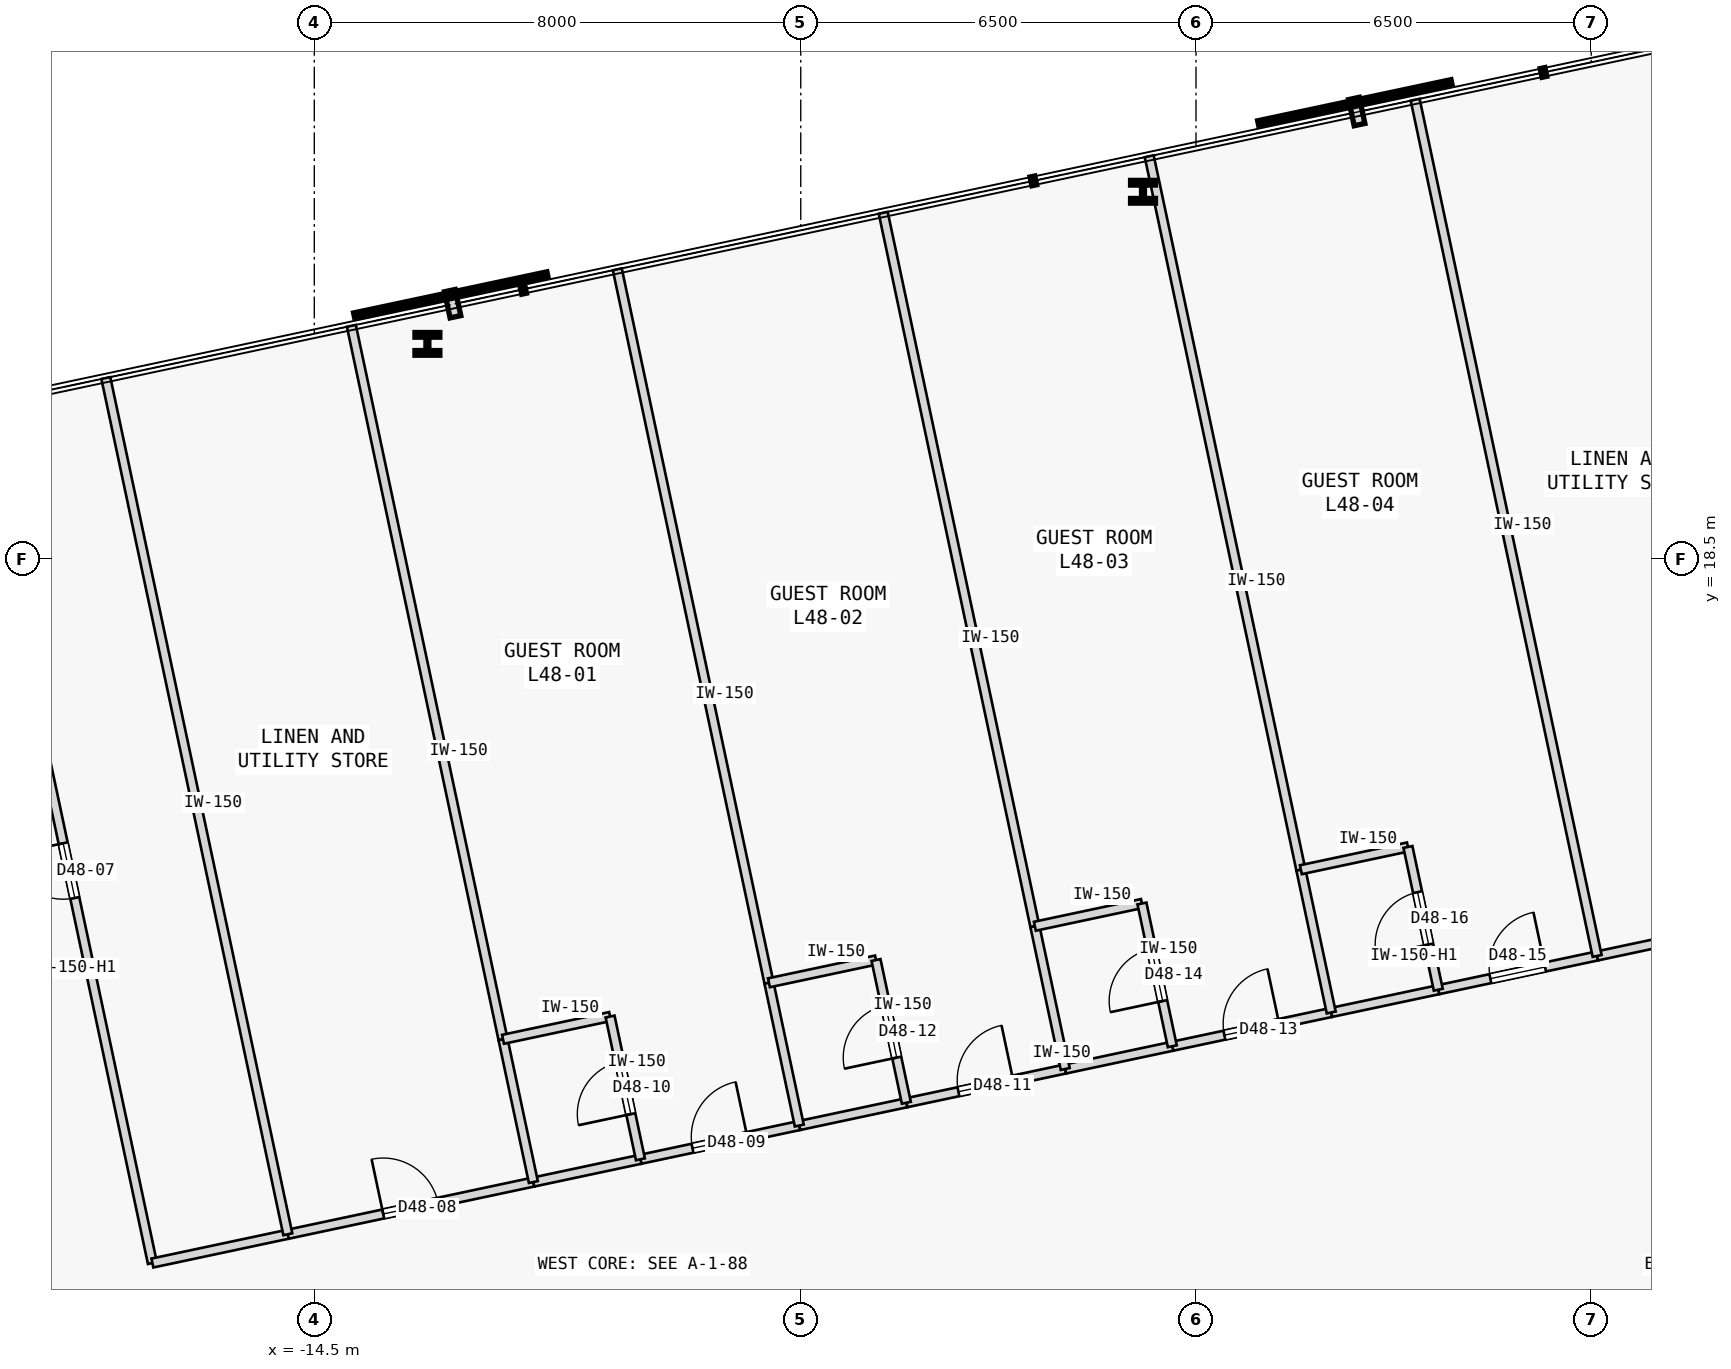
"""IFC4 building model, lengths in metres.
Left out: names, types, materials, properties, quantities, classifications, styles, units other than length and angle.
Written with IfcOpenShell. Run it as: python <this file> out.ifc"""

import sys

from ifc_helpers import new_model, si_unit, direction, frame, frame_2d, origin, origin_2d, place, context, subcontext, project, spatial, rectangle, i_section, extrude, element, fill, save


model = new_model("IFC4")
c1 = context("Model", 3, precision=1e-05, world=origin(), true_north=direction((0.0, 1.0)))
c2 = subcontext(c1, "Body", "Model", "MODEL_VIEW")
j1 = project(units=[si_unit("LENGTHUNIT", "METRE"), si_unit("PLANEANGLEUNIT", "RADIAN")], contexts=[c1])
p1 = place(None, origin())
s1 = spatial("IfcSite", under=j1, at=p1, CompositionType="ELEMENT")
p2 = place(p1, origin())
s2 = spatial("IfcBuilding", under=s1, at=p2, CompositionType="ELEMENT")
p3 = place(p2, frame((0.0, 0.0, 185.4)))
s3 = spatial("IfcBuildingStorey", under=s2, at=p3, CompositionType="ELEMENT", Elevation=185.4)
for number, where, z_axis, x_axis in (
    (1, (-0.872, 24.543, 0.0), (0.0, 0.0, 1.0), (1.0, 0.0, 0.0)),
    (2, (-12.64, 22.042, 0.0), (0.0, 0.0, 1.0), (1.0, 0.0, 0.0)),
):
    element("IfcColumn", number, at=place(p3, frame(where, z_axis=z_axis, x_axis=x_axis)), inside=s3, PredefinedType="COLUMN", context=c2, shape_type="SweptSolid", body=[
        extrude(i_section(OverallWidth=0.409, OverallDepth=0.374, WebThickness=0.048, FlangeThickness=0.077, FilletRadius=0.015, at=origin_2d()), origin(), (0.0, 0.0, 1.0), 3.4),
    ])
p4 = place(p3, frame((-17.162, 6.926, 0.0), z_axis=(0.0, 0.0, 1.0), x_axis=(-0.207911421929, 0.978147657888, 0.0)))
e3 = element("IfcWall", 3, at=p4, inside=s3, PredefinedType="PARTITIONING", context=c2, shape_type="SweptSolid", body=[
    extrude(rectangle(XDim=13.195, YDim=0.15, at=frame_2d((6.598, 0.0))), origin(), (0.0, 0.0, 1.0), 2.725),
])
p5 = place(p4, frame((6.137, 0.0, 0.0)))
e4 = element("IfcOpeningElement", 4, at=p5, cuts=e3, PredefinedType="OPENING", context=c2, shape_type="SweptSolid", body=[
    extrude(rectangle(XDim=0.92, YDim=2.15, at=frame_2d((0.46, 1.075))), frame((0.0, 0.085, 0.0), z_axis=(0.0, -1.0, 0.0), x_axis=(1.0, 0.0, 0.0)), (0.0, 0.0, 1.0), 0.17),
])
p6 = place(p3, frame((-17.162, 6.926, 0.0), z_axis=(0.0, 0.0, 1.0), x_axis=(0.978124500572, 0.208020338863, 0.0)))
e5 = element("IfcWall", 5, at=p6, inside=s3, PredefinedType="PARTITIONING", context=c2, shape_type="SweptSolid", body=[
    extrude(rectangle(XDim=2.277, YDim=0.15, at=frame_2d((1.138, 0.0))), origin(), (0.0, 0.0, 1.0), 3.175),
])
p7 = place(p3, frame((-14.935, 7.399, 0.0), z_axis=(0.0, 0.0, 1.0), x_axis=(0.978153289129, 0.20788492722, 0.0)))
e6 = element("IfcWall", 6, at=p7, inside=s3, PredefinedType="PARTITIONING", context=c2, shape_type="SweptSolid", body=[
    extrude(rectangle(XDim=4.128, YDim=0.15, at=frame_2d((2.064, 0.0))), origin(), (0.0, 0.0, 1.0), 3.175),
])
p8 = place(p7, frame((1.604, 0.0, 0.0)))
e7 = element("IfcOpeningElement", 7, at=p8, cuts=e6, PredefinedType="OPENING", context=c2, shape_type="SweptSolid", body=[
    extrude(rectangle(XDim=0.92, YDim=2.15, at=frame_2d((0.46, 1.075))), frame((0.0, 0.085, 0.0), z_axis=(0.0, -1.0, 0.0), x_axis=(1.0, 0.0, 0.0)), (0.0, 0.0, 1.0), 0.17),
])
p9 = place(p3, frame((-9.137, 8.632, 0.0), z_axis=(0.0, 0.0, 1.0), x_axis=(0.978158153975, 0.207862035524, 0.0)))
e8 = element("IfcWall", 8, at=p9, inside=s3, PredefinedType="PARTITIONING", context=c2, shape_type="SweptSolid", body=[
    extrude(rectangle(XDim=2.671, YDim=0.15, at=frame_2d((1.335, 0.0))), origin(), (0.0, 0.0, 1.0), 3.175),
])
p10 = place(p9, frame((0.875, 0.0, 0.0)))
e9 = element("IfcOpeningElement", 9, at=p10, cuts=e8, PredefinedType="OPENING", context=c2, shape_type="SweptSolid", body=[
    extrude(rectangle(XDim=0.92, YDim=2.15, at=frame_2d((0.46, 1.075))), frame((0.0, 0.085, 0.0), z_axis=(0.0, -1.0, 0.0), x_axis=(1.0, 0.0, 0.0)), (0.0, 0.0, 1.0), 0.17),
])
p11 = place(p3, frame((-10.897, 8.258, 0.0), z_axis=(0.0, 0.0, 1.0), x_axis=(0.978146440129, 0.207917150959, 0.0)))
e10 = element("IfcWall", 10, at=p11, inside=s3, PredefinedType="PARTITIONING", context=c2, shape_type="SweptSolid", body=[
    extrude(rectangle(XDim=1.8, YDim=0.15, at=frame_2d((0.9, 0.0))), origin(), (0.0, 0.0, 1.0), 3.175),
])
p12 = place(p3, frame((-4.763, 9.561, 0.0), z_axis=(0.0, 0.0, 1.0), x_axis=(0.978139565144, 0.207949491702, 0.0)))
e11 = element("IfcWall", 11, at=p12, inside=s3, PredefinedType="PARTITIONING", context=c2, shape_type="SweptSolid", body=[
    extrude(rectangle(XDim=2.671, YDim=0.15, at=frame_2d((1.335, 0.0))), origin(), (0.0, 0.0, 1.0), 3.175),
])
p13 = place(p12, frame((0.875, 0.0, 0.0)))
e12 = element("IfcOpeningElement", 12, at=p13, cuts=e11, PredefinedType="OPENING", context=c2, shape_type="SweptSolid", body=[
    extrude(rectangle(XDim=0.92, YDim=2.15, at=frame_2d((0.46, 1.075))), frame((0.0, 0.085, 0.0), z_axis=(0.0, -1.0, 0.0), x_axis=(1.0, 0.0, 0.0)), (0.0, 0.0, 1.0), 0.17),
])
p14 = place(p3, frame((-6.524, 9.187, 0.0), z_axis=(0.0, 0.0, 1.0), x_axis=(0.978146440129, 0.207917150959, 0.0)))
e13 = element("IfcWall", 13, at=p14, inside=s3, PredefinedType="PARTITIONING", context=c2, shape_type="SweptSolid", body=[
    extrude(rectangle(XDim=1.8, YDim=0.15, at=frame_2d((0.9, 0.0))), origin(), (0.0, 0.0, 1.0), 3.175),
])
p15 = place(p3, frame((-0.39, 10.491, 0.0), z_axis=(0.0, 0.0, 1.0), x_axis=(0.978155367406, 0.207875148141, 0.0)))
e14 = element("IfcWall", 14, at=p15, inside=s3, PredefinedType="PARTITIONING", context=c2, shape_type="SweptSolid", body=[
    extrude(rectangle(XDim=2.672, YDim=0.15, at=frame_2d((1.336, 0.0))), origin(), (0.0, 0.0, 1.0), 3.175),
])
p16 = place(p15, frame((0.876, 0.0, 0.0)))
e15 = element("IfcOpeningElement", 15, at=p16, cuts=e14, PredefinedType="OPENING", context=c2, shape_type="SweptSolid", body=[
    extrude(rectangle(XDim=0.92, YDim=2.15, at=frame_2d((0.46, 1.075))), frame((0.0, 0.085, 0.0), z_axis=(0.0, -1.0, 0.0), x_axis=(1.0, 0.0, 0.0)), (0.0, 0.0, 1.0), 0.17),
])
p17 = place(p3, frame((-2.151, 10.117, 0.0), z_axis=(0.0, 0.0, 1.0), x_axis=(0.978146440129, 0.207917150959, 0.0)))
e16 = element("IfcWall", 16, at=p17, inside=s3, PredefinedType="PARTITIONING", context=c2, shape_type="SweptSolid", body=[
    extrude(rectangle(XDim=1.8, YDim=0.15, at=frame_2d((0.9, 0.0))), origin(), (0.0, 0.0, 1.0), 3.175),
])
p18 = place(p3, frame((3.984, 11.421, 0.0), z_axis=(0.0, 0.0, 1.0), x_axis=(0.978139565144, 0.207949491702, 0.0)))
e17 = element("IfcWall", 17, at=p18, inside=s3, PredefinedType="PARTITIONING", context=c2, shape_type="SweptSolid", body=[
    extrude(rectangle(XDim=2.671, YDim=0.15, at=frame_2d((1.335, 0.0))), origin(), (0.0, 0.0, 1.0), 3.175),
])
p19 = place(p18, frame((0.875, 0.0, 0.0)))
e18 = element("IfcOpeningElement", 18, at=p19, cuts=e17, PredefinedType="OPENING", context=c2, shape_type="SweptSolid", body=[
    extrude(rectangle(XDim=0.92, YDim=2.15, at=frame_2d((0.46, 1.075))), frame((0.0, 0.085, 0.0), z_axis=(0.0, -1.0, 0.0), x_axis=(1.0, 0.0, 0.0)), (0.0, 0.0, 1.0), 0.17),
])
p20 = place(p3, frame((2.223, 11.046, 0.0), z_axis=(0.0, 0.0, 1.0), x_axis=(0.978146440129, 0.207917150959, 0.0)))
e19 = element("IfcWall", 19, at=p20, inside=s3, PredefinedType="PARTITIONING", context=c2, shape_type="SweptSolid", body=[
    extrude(rectangle(XDim=1.8, YDim=0.15, at=frame_2d((0.9, 0.0))), origin(), (0.0, 0.0, 1.0), 3.175),
])
p21 = place(p3, frame((6.597, 11.976, 0.0), z_axis=(0.0, 0.0, 1.0), x_axis=(0.978155092113, 0.207876443525, 0.0)))
e20 = element("IfcWall", 20, at=p21, inside=s3, PredefinedType="PARTITIONING", context=c2, shape_type="SweptSolid", body=[
    extrude(rectangle(XDim=4.127, YDim=0.15, at=frame_2d((2.063, 0.0))), origin(), (0.0, 0.0, 1.0), 3.175),
])
p22 = place(p21, frame((1.604, 0.0, 0.0)))
e21 = element("IfcOpeningElement", 21, at=p22, cuts=e20, PredefinedType="OPENING", context=c2, shape_type="SweptSolid", body=[
    extrude(rectangle(XDim=0.92, YDim=2.15, at=frame_2d((0.46, 1.075))), frame((0.0, 0.085, 0.0), z_axis=(0.0, -1.0, 0.0), x_axis=(1.0, 0.0, 0.0)), (0.0, 0.0, 1.0), 0.17),
])
p23 = place(p3, frame((-18.207, 1.74, 0.0), z_axis=(0.0, 0.0, 1.0), x_axis=(-0.20793874598, 0.97814184959, 0.0)))
e22 = element("IfcWall", 22, at=p23, inside=s3, PredefinedType="PARTITIONING", context=c2, shape_type="SweptSolid", body=[
    extrude(rectangle(XDim=4.855, YDim=0.15, at=frame_2d((2.427, 0.0))), origin(), (0.0, 0.0, 1.0), 3.175),
])
p24 = place(p23, frame((1.952, 0.0, 0.0)))
e23 = element("IfcOpeningElement", 23, at=p24, cuts=e22, PredefinedType="OPENING", context=c2, shape_type="SweptSolid", body=[
    extrude(rectangle(XDim=0.95, YDim=2.15, at=frame_2d((0.475, 1.075))), frame((0.0, 0.085, 0.0), z_axis=(0.0, -1.0, 0.0), x_axis=(1.0, 0.0, 0.0)), (0.0, 0.0, 1.0), 0.17),
])
p25 = place(p3, frame((-14.935, 7.399, 0.0), z_axis=(0.0, 0.0, 1.0), x_axis=(-0.207899121568, 0.978150272326, 0.0)))
e24 = element("IfcWall", 24, at=p25, inside=s3, PredefinedType="PARTITIONING", context=c2, shape_type="SweptSolid", body=[
    extrude(rectangle(XDim=14.395, YDim=0.15, at=frame_2d((7.197, 0.0))), origin(), (0.0, 0.0, 1.0), 3.175),
])
p26 = place(p3, frame((-11.396, 10.605, 0.0), z_axis=(0.0, 0.0, 1.0), x_axis=(-0.207910848762, 0.978147779718, 0.0)))
e25 = element("IfcWall", 25, at=p26, inside=s3, PredefinedType="PARTITIONING", context=c2, shape_type="SweptSolid", body=[
    extrude(rectangle(XDim=11.995, YDim=0.15, at=frame_2d((5.998, 0.0))), origin(), (0.0, 0.0, 1.0), 3.175),
])
p27 = place(p3, frame((-10.897, 8.258, 0.0), z_axis=(0.0, 0.0, 1.0), x_axis=(-0.207937840262, 0.978142042133, 0.0)))
e26 = element("IfcWall", 26, at=p27, inside=s3, PredefinedType="PARTITIONING", context=c2, shape_type="SweptSolid", body=[
    extrude(rectangle(XDim=2.4, YDim=0.15, at=frame_2d((1.2, 0.0))), origin(), (0.0, 0.0, 1.0), 3.175),
])
p28 = place(p3, frame((-11.396, 10.605, 0.0), z_axis=(0.0, 0.0, 1.0), x_axis=(0.978118849246, 0.208046909975, 0.0)))
e27 = element("IfcWall", 27, at=p28, inside=s3, PredefinedType="PARTITIONING", context=c2, shape_type="SweptSolid", body=[
    extrude(rectangle(XDim=1.8, YDim=0.15, at=frame_2d((0.9, 0.0))), origin(), (0.0, 0.0, 1.0), 3.175),
])
p29 = place(p3, frame((-9.137, 8.632, 0.0), z_axis=(0.0, 0.0, 1.0), x_axis=(-0.207917150959, 0.978146440129, 0.0)))
e28 = element("IfcWall", 28, at=p29, inside=s3, PredefinedType="PARTITIONING", context=c2, shape_type="SweptSolid", body=[
    extrude(rectangle(XDim=2.4, YDim=0.15, at=frame_2d((1.2, 0.0))), origin(), (0.0, 0.0, 1.0), 3.175),
])
p30 = place(p29, frame((0.76, 0.0, 0.0)))
e29 = element("IfcOpeningElement", 29, at=p30, cuts=e28, PredefinedType="OPENING", context=c2, shape_type="SweptSolid", body=[
    extrude(rectangle(XDim=0.88, YDim=2.15, at=frame_2d((0.44, 1.075))), frame((0.0, 0.085, 0.0), z_axis=(0.0, -1.0, 0.0), x_axis=(1.0, 0.0, 0.0)), (0.0, 0.0, 1.0), 0.17),
])
p31 = place(p3, frame((-7.023, 11.535, 0.0), z_axis=(0.0, 0.0, 1.0), x_axis=(-0.207910848762, 0.978147779718, 0.0)))
e30 = element("IfcWall", 30, at=p31, inside=s3, PredefinedType="PARTITIONING", context=c2, shape_type="SweptSolid", body=[
    extrude(rectangle(XDim=11.995, YDim=0.15, at=frame_2d((5.998, 0.0))), origin(), (0.0, 0.0, 1.0), 3.175),
])
p32 = place(p3, frame((-6.524, 9.187, 0.0), z_axis=(0.0, 0.0, 1.0), x_axis=(-0.207917150959, 0.978146440129, 0.0)))
e31 = element("IfcWall", 31, at=p32, inside=s3, PredefinedType="PARTITIONING", context=c2, shape_type="SweptSolid", body=[
    extrude(rectangle(XDim=2.4, YDim=0.15, at=frame_2d((1.2, 0.0))), origin(), (0.0, 0.0, 1.0), 3.175),
])
p33 = place(p3, frame((-7.023, 11.535, 0.0), z_axis=(0.0, 0.0, 1.0), x_axis=(0.978146440129, 0.207917150959, 0.0)))
e32 = element("IfcWall", 32, at=p33, inside=s3, PredefinedType="PARTITIONING", context=c2, shape_type="SweptSolid", body=[
    extrude(rectangle(XDim=1.8, YDim=0.15, at=frame_2d((0.9, 0.0))), origin(), (0.0, 0.0, 1.0), 3.175),
])
p34 = place(p3, frame((-4.763, 9.561, 0.0), z_axis=(0.0, 0.0, 1.0), x_axis=(-0.207917150959, 0.978146440129, 0.0)))
e33 = element("IfcWall", 33, at=p34, inside=s3, PredefinedType="PARTITIONING", context=c2, shape_type="SweptSolid", body=[
    extrude(rectangle(XDim=2.4, YDim=0.15, at=frame_2d((1.2, 0.0))), origin(), (0.0, 0.0, 1.0), 3.175),
])
p35 = place(p34, frame((0.76, 0.0, 0.0)))
e34 = element("IfcOpeningElement", 34, at=p35, cuts=e33, PredefinedType="OPENING", context=c2, shape_type="SweptSolid", body=[
    extrude(rectangle(XDim=0.88, YDim=2.15, at=frame_2d((0.44, 1.075))), frame((0.0, 0.085, 0.0), z_axis=(0.0, -1.0, 0.0), x_axis=(1.0, 0.0, 0.0)), (0.0, 0.0, 1.0), 0.17),
])
p36 = place(p3, frame((-2.65, 12.464, 0.0), z_axis=(0.0, 0.0, 1.0), x_axis=(-0.207914988081, 0.978146899873, 0.0)))
e35 = element("IfcWall", 35, at=p36, inside=s3, PredefinedType="PARTITIONING", context=c2, shape_type="SweptSolid", body=[
    extrude(rectangle(XDim=11.995, YDim=0.15, at=frame_2d((5.998, 0.0))), origin(), (0.0, 0.0, 1.0), 3.175),
])
p37 = place(p3, frame((-2.151, 10.117, 0.0), z_axis=(0.0, 0.0, 1.0), x_axis=(-0.207917150959, 0.978146440129, 0.0)))
e36 = element("IfcWall", 36, at=p37, inside=s3, PredefinedType="PARTITIONING", context=c2, shape_type="SweptSolid", body=[
    extrude(rectangle(XDim=2.4, YDim=0.15, at=frame_2d((1.2, 0.0))), origin(), (0.0, 0.0, 1.0), 3.175),
])
p38 = place(p3, frame((-2.65, 12.464, 0.0), z_axis=(0.0, 0.0, 1.0), x_axis=(0.978174015353, 0.207787380965, 0.0)))
e37 = element("IfcWall", 37, at=p38, inside=s3, PredefinedType="PARTITIONING", context=c2, shape_type="SweptSolid", body=[
    extrude(rectangle(XDim=1.8, YDim=0.15, at=frame_2d((0.9, 0.0))), origin(), (0.0, 0.0, 1.0), 3.175),
])
p39 = place(p3, frame((-0.39, 10.491, 0.0), z_axis=(0.0, 0.0, 1.0), x_axis=(-0.207937840262, 0.978142042133, 0.0)))
e38 = element("IfcWall", 38, at=p39, inside=s3, PredefinedType="PARTITIONING", context=c2, shape_type="SweptSolid", body=[
    extrude(rectangle(XDim=2.4, YDim=0.15, at=frame_2d((1.2, 0.0))), origin(), (0.0, 0.0, 1.0), 3.175),
])
p40 = place(p39, frame((0.76, 0.0, 0.0)))
e39 = element("IfcOpeningElement", 39, at=p40, cuts=e38, PredefinedType="OPENING", context=c2, shape_type="SweptSolid", body=[
    extrude(rectangle(XDim=0.88, YDim=2.15, at=frame_2d((0.44, 1.075))), frame((0.0, 0.085, 0.0), z_axis=(0.0, -1.0, 0.0), x_axis=(1.0, 0.0, 0.0)), (0.0, 0.0, 1.0), 0.17),
])
p41 = place(p3, frame((1.725, 13.394, 0.0), z_axis=(0.0, 0.0, 1.0), x_axis=(-0.207910848762, 0.978147779718, 0.0)))
e40 = element("IfcWall", 40, at=p41, inside=s3, PredefinedType="PARTITIONING", context=c2, shape_type="SweptSolid", body=[
    extrude(rectangle(XDim=11.995, YDim=0.15, at=frame_2d((5.998, 0.0))), origin(), (0.0, 0.0, 1.0), 3.175),
])
p42 = place(p3, frame((2.223, 11.046, 0.0), z_axis=(0.0, 0.0, 1.0), x_axis=(-0.207819824493, 0.978167123015, 0.0)))
e41 = element("IfcWall", 41, at=p42, inside=s3, PredefinedType="PARTITIONING", context=c2, shape_type="SweptSolid", body=[
    extrude(rectangle(XDim=2.4, YDim=0.15, at=frame_2d((1.2, 0.0))), origin(), (0.0, 0.0, 1.0), 3.175),
])
p43 = place(p3, frame((1.725, 13.394, 0.0), z_axis=(0.0, 0.0, 1.0), x_axis=(0.978140575842, 0.207944737591, 0.0)))
e42 = element("IfcWall", 42, at=p43, inside=s3, PredefinedType="PARTITIONING", context=c2, shape_type="SweptSolid", body=[
    extrude(rectangle(XDim=1.8, YDim=0.15, at=frame_2d((0.9, 0.0))), origin(), (0.0, 0.0, 1.0), 3.175),
])
p44 = place(p3, frame((3.984, 11.421, 0.0), z_axis=(0.0, 0.0, 1.0), x_axis=(-0.207917150959, 0.978146440129, 0.0)))
e43 = element("IfcWall", 43, at=p44, inside=s3, PredefinedType="PARTITIONING", context=c2, shape_type="SweptSolid", body=[
    extrude(rectangle(XDim=2.4, YDim=0.15, at=frame_2d((1.2, 0.0))), origin(), (0.0, 0.0, 1.0), 2.725),
])
p45 = place(p44, frame((0.76, 0.0, 0.0)))
e44 = element("IfcOpeningElement", 44, at=p45, cuts=e43, PredefinedType="OPENING", context=c2, shape_type="SweptSolid", body=[
    extrude(rectangle(XDim=0.88, YDim=2.15, at=frame_2d((0.44, 1.075))), frame((0.0, 0.085, 0.0), z_axis=(0.0, -1.0, 0.0), x_axis=(1.0, 0.0, 0.0)), (0.0, 0.0, 1.0), 0.17),
])
p46 = place(p3, frame((6.597, 11.976, 0.0), z_axis=(0.0, 0.0, 1.0), x_axis=(-0.207899121568, 0.978150272326, 0.0)))
e45 = element("IfcWall", 45, at=p46, inside=s3, PredefinedType="PARTITIONING", context=c2, shape_type="SweptSolid", body=[
    extrude(rectangle(XDim=14.395, YDim=0.15, at=frame_2d((7.197, 0.0))), origin(), (0.0, 0.0, 1.0), 3.175),
])
p47 = place(p5, origin())
e46 = element("IfcDoor", 46, at=p47, inside=s3, OperationType="SINGLE_SWING_RIGHT", PredefinedType="DOOR", context=c2, shape_type="SweptSolid", body=[
    extrude(rectangle(XDim=0.92, YDim=2.15, at=frame_2d((0.46, 1.075))), frame((0.0, 0.025, 0.0), z_axis=(0.0, -1.0, 0.0), x_axis=(1.0, 0.0, 0.0)), (0.0, 0.0, 1.0), 0.05),
])
fill(e4, e46)
p48 = place(p8, origin())
e47 = element("IfcDoor", 47, at=p48, inside=s3, OperationType="SINGLE_SWING_LEFT", PredefinedType="DOOR", context=c2, shape_type="SweptSolid", body=[
    extrude(rectangle(XDim=0.92, YDim=2.15, at=frame_2d((0.46, 1.075))), frame((0.0, 0.025, 0.0), z_axis=(0.0, -1.0, 0.0), x_axis=(1.0, 0.0, 0.0)), (0.0, 0.0, 1.0), 0.05),
])
fill(e7, e47)
p49 = place(p10, origin())
e48 = element("IfcDoor", 48, at=p49, inside=s3, OperationType="SINGLE_SWING_RIGHT", PredefinedType="DOOR", context=c2, shape_type="SweptSolid", body=[
    extrude(rectangle(XDim=0.92, YDim=2.15, at=frame_2d((0.46, 1.075))), frame((0.0, 0.025, 0.0), z_axis=(0.0, -1.0, 0.0), x_axis=(1.0, 0.0, 0.0)), (0.0, 0.0, 1.0), 0.05),
])
fill(e9, e48)
p50 = place(p30, origin())
e49 = element("IfcDoor", 49, at=p50, inside=s3, OperationType="SINGLE_SWING_LEFT", PredefinedType="DOOR", context=c2, shape_type="SweptSolid", body=[
    extrude(rectangle(XDim=0.88, YDim=2.15, at=frame_2d((0.44, 1.075))), frame((0.0, 0.025, 0.0), z_axis=(0.0, -1.0, 0.0), x_axis=(1.0, 0.0, 0.0)), (0.0, 0.0, 1.0), 0.05),
])
fill(e29, e49)
p51 = place(p13, origin())
e50 = element("IfcDoor", 50, at=p51, inside=s3, OperationType="SINGLE_SWING_RIGHT", PredefinedType="DOOR", context=c2, shape_type="SweptSolid", body=[
    extrude(rectangle(XDim=0.92, YDim=2.15, at=frame_2d((0.46, 1.075))), frame((0.0, 0.025, 0.0), z_axis=(0.0, -1.0, 0.0), x_axis=(1.0, 0.0, 0.0)), (0.0, 0.0, 1.0), 0.05),
])
fill(e12, e50)
p52 = place(p35, origin())
e51 = element("IfcDoor", 51, at=p52, inside=s3, OperationType="SINGLE_SWING_LEFT", PredefinedType="DOOR", context=c2, shape_type="SweptSolid", body=[
    extrude(rectangle(XDim=0.88, YDim=2.15, at=frame_2d((0.44, 1.075))), frame((0.0, 0.025, 0.0), z_axis=(0.0, -1.0, 0.0), x_axis=(1.0, 0.0, 0.0)), (0.0, 0.0, 1.0), 0.05),
])
fill(e34, e51)
p53 = place(p16, origin())
e52 = element("IfcDoor", 52, at=p53, inside=s3, OperationType="SINGLE_SWING_RIGHT", PredefinedType="DOOR", context=c2, shape_type="SweptSolid", body=[
    extrude(rectangle(XDim=0.92, YDim=2.15, at=frame_2d((0.46, 1.075))), frame((0.0, 0.025, 0.0), z_axis=(0.0, -1.0, 0.0), x_axis=(1.0, 0.0, 0.0)), (0.0, 0.0, 1.0), 0.05),
])
fill(e15, e52)
p54 = place(p40, origin())
e53 = element("IfcDoor", 53, at=p54, inside=s3, OperationType="SINGLE_SWING_LEFT", PredefinedType="DOOR", context=c2, shape_type="SweptSolid", body=[
    extrude(rectangle(XDim=0.88, YDim=2.15, at=frame_2d((0.44, 1.075))), frame((0.0, 0.025, 0.0), z_axis=(0.0, -1.0, 0.0), x_axis=(1.0, 0.0, 0.0)), (0.0, 0.0, 1.0), 0.05),
])
fill(e39, e53)
p55 = place(p19, origin())
e54 = element("IfcDoor", 54, at=p55, inside=s3, OperationType="SINGLE_SWING_RIGHT", PredefinedType="DOOR", context=c2, shape_type="SweptSolid", body=[
    extrude(rectangle(XDim=0.92, YDim=2.15, at=frame_2d((0.46, 1.075))), frame((0.0, 0.025, 0.0), z_axis=(0.0, -1.0, 0.0), x_axis=(1.0, 0.0, 0.0)), (0.0, 0.0, 1.0), 0.05),
])
fill(e18, e54)
p56 = place(p45, origin())
e55 = element("IfcDoor", 55, at=p56, inside=s3, OperationType="SINGLE_SWING_LEFT", PredefinedType="DOOR", context=c2, shape_type="SweptSolid", body=[
    extrude(rectangle(XDim=0.88, YDim=2.15, at=frame_2d((0.44, 1.075))), frame((0.0, 0.025, 0.0), z_axis=(0.0, -1.0, 0.0), x_axis=(1.0, 0.0, 0.0)), (0.0, 0.0, 1.0), 0.05),
])
fill(e44, e55)
save(model, sys.argv[1])
